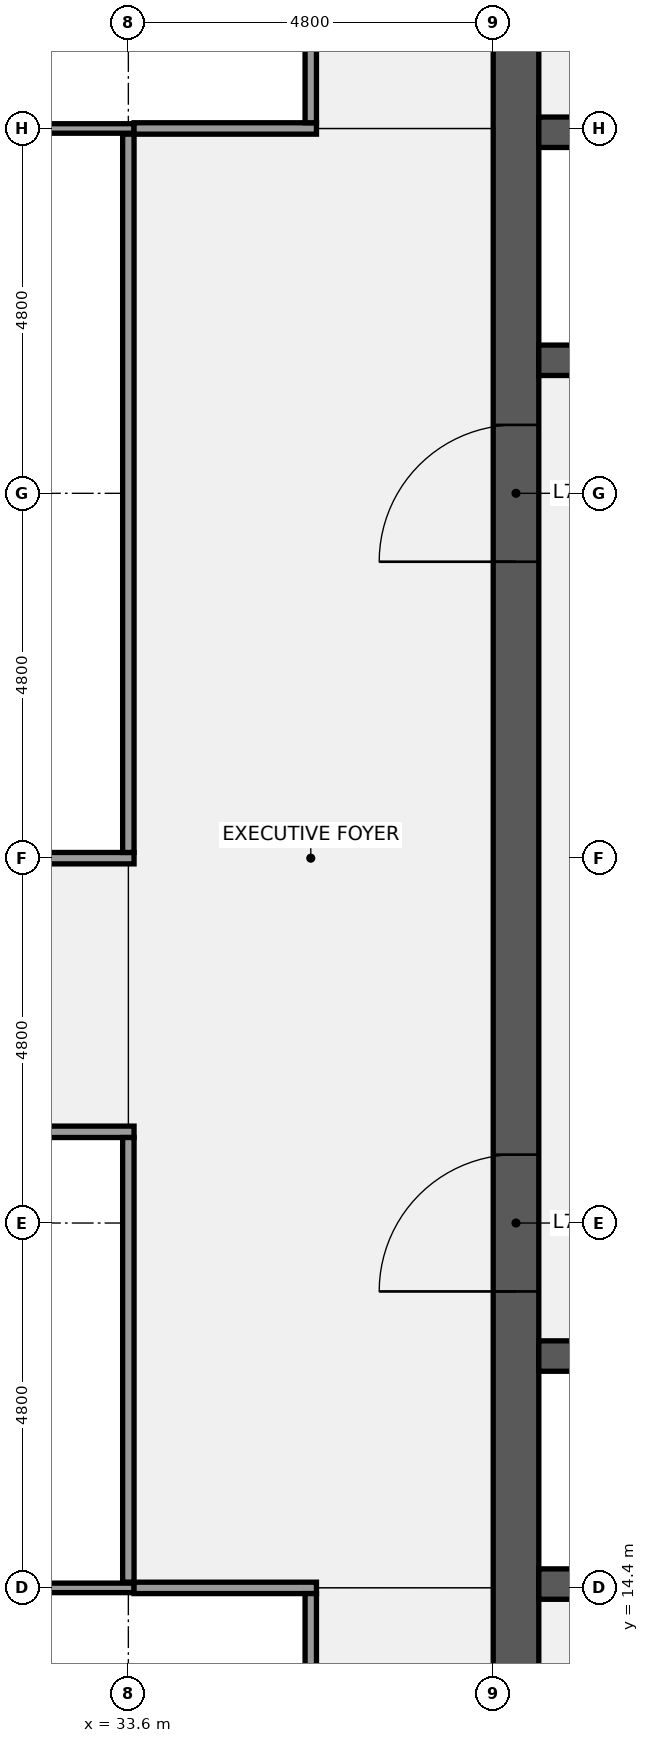
"""IFC4 building model, lengths in metres.
Left out: names, types, materials, properties, quantities, classifications, styles, units other than length and angle.
Written with IfcOpenShell. Run it as: python <this file> out.ifc"""

import sys

from ifc_helpers import new_model, si_unit, direction, frame, frame_2d, origin, place, context, subcontext, project, spatial, rectangle, extrude, element, fill, save


model = new_model("IFC4")
c1 = context("Model", 3, precision=1e-05, world=origin(), true_north=direction((0.0, 1.0)))
c2 = subcontext(c1, "Body", "Model", "MODEL_VIEW")
j1 = project(units=[si_unit("LENGTHUNIT", "METRE"), si_unit("PLANEANGLEUNIT", "RADIAN")], contexts=[c1])
p1 = place(None, origin())
s1 = spatial("IfcSite", under=j1, at=p1, CompositionType="ELEMENT")
p2 = place(p1, origin())
s2 = spatial("IfcBuilding", under=s1, at=p2, CompositionType="ELEMENT")
p3 = place(p2, frame((0.0, 0.0, 346.3)))
s3 = spatial("IfcBuildingStorey", under=s2, at=p3, CompositionType="ELEMENT", Elevation=346.3)
p4 = place(p3, frame((38.7, 9.6, 0.0), z_axis=(0.0, 0.0, 1.0), x_axis=(0.0, 1.0, 0.0)))
e1 = element("IfcWall", 1, at=p4, inside=s3, PredefinedType="SHEAR", context=c2, shape_type="SweptSolid", body=[
    extrude(rectangle(XDim=28.8, YDim=0.6, at=frame_2d((14.4, 0.0))), origin(), (0.0, 0.0, 1.0), 3.84),
])
p5 = place(p4, frame((8.7, 0.0, 0.0)))
e2 = element("IfcOpeningElement", 2, at=p5, cuts=e1, PredefinedType="OPENING", context=c2, shape_type="SweptSolid", body=[
    extrude(rectangle(XDim=1.8, YDim=2.1, at=frame_2d((0.9, 1.05))), frame((0.0, 0.31, 0.0), z_axis=(0.0, -1.0, 0.0), x_axis=(1.0, 0.0, 0.0)), (0.0, 0.0, 1.0), 0.62),
])
p6 = place(p4, frame((18.3, 0.0, 0.0)))
e3 = element("IfcOpeningElement", 3, at=p6, cuts=e1, PredefinedType="OPENING", context=c2, shape_type="SweptSolid", body=[
    extrude(rectangle(XDim=1.8, YDim=2.1, at=frame_2d((0.9, 1.05))), frame((0.0, 0.31, 0.0), z_axis=(0.0, -1.0, 0.0), x_axis=(1.0, 0.0, 0.0)), (0.0, 0.0, 1.0), 0.62),
])
p7 = place(p3, frame((39.0, 14.45, 0.0), z_axis=(0.0, 0.0, 1.0), x_axis=(1.0, 0.0, 0.0)))
e4 = element("IfcWall", 4, at=p7, inside=s3, PredefinedType="SHEAR", context=c2, shape_type="SweptSolid", body=[
    extrude(rectangle(XDim=18.0, YDim=0.4, at=frame_2d((9.0, 0.0))), origin(), (0.0, 0.0, 1.0), 3.84),
])
p8 = place(p3, frame((39.0, 17.45, 0.0), z_axis=(0.0, 0.0, 1.0), x_axis=(1.0, 0.0, 0.0)))
e5 = element("IfcWall", 5, at=p8, inside=s3, PredefinedType="SHEAR", context=c2, shape_type="SweptSolid", body=[
    extrude(rectangle(XDim=18.0, YDim=0.4, at=frame_2d((9.0, 0.0))), origin(), (0.0, 0.0, 1.0), 3.84),
])
p9 = place(p8, frame((13.637, 0.0, 0.0)))
e6 = element("IfcOpeningElement", 6, at=p9, cuts=e5, PredefinedType="OPENING", context=c2, shape_type="SweptSolid", body=[
    extrude(rectangle(XDim=1.0, YDim=2.1, at=frame_2d((0.5, 1.05))), frame((0.0, 0.21, 0.0), z_axis=(0.0, -1.0, 0.0), x_axis=(1.0, 0.0, 0.0)), (0.0, 0.0, 1.0), 0.42),
])
p10 = place(p8, frame((7.9, 0.0, 0.0)))
e7 = element("IfcOpeningElement", 7, at=p10, cuts=e5, PredefinedType="OPENING", context=c2, shape_type="SweptSolid", body=[
    extrude(rectangle(XDim=1.0, YDim=2.1, at=frame_2d((0.5, 1.05))), frame((0.0, 0.21, 0.0), z_axis=(0.0, -1.0, 0.0), x_axis=(1.0, 0.0, 0.0)), (0.0, 0.0, 1.0), 0.42),
])
p11 = place(p8, frame((4.6, 0.0, 0.0)))
e8 = element("IfcOpeningElement", 8, at=p11, cuts=e5, PredefinedType="OPENING", context=c2, shape_type="SweptSolid", body=[
    extrude(rectangle(XDim=1.0, YDim=2.1, at=frame_2d((0.5, 1.05))), frame((0.0, 0.21, 0.0), z_axis=(0.0, -1.0, 0.0), x_axis=(1.0, 0.0, 0.0)), (0.0, 0.0, 1.0), 0.42),
])
p12 = place(p8, frame((1.262, 0.0, 0.0)))
e9 = element("IfcOpeningElement", 9, at=p12, cuts=e5, PredefinedType="OPENING", context=c2, shape_type="SweptSolid", body=[
    extrude(rectangle(XDim=1.0, YDim=2.1, at=frame_2d((0.5, 1.05))), frame((0.0, 0.21, 0.0), z_axis=(0.0, -1.0, 0.0), x_axis=(1.0, 0.0, 0.0)), (0.0, 0.0, 1.0), 0.42),
])
p13 = place(p3, frame((39.0, 30.55, 0.0), z_axis=(0.0, 0.0, 1.0), x_axis=(1.0, 0.0, 0.0)))
e10 = element("IfcWall", 10, at=p13, inside=s3, PredefinedType="SHEAR", context=c2, shape_type="SweptSolid", body=[
    extrude(rectangle(XDim=18.0, YDim=0.4, at=frame_2d((9.0, 0.0))), origin(), (0.0, 0.0, 1.0), 3.84),
])
p14 = place(p13, frame((15.2, 0.0, 0.0)))
e11 = element("IfcOpeningElement", 11, at=p14, cuts=e10, PredefinedType="OPENING", context=c2, shape_type="SweptSolid", body=[
    extrude(rectangle(XDim=1.2, YDim=2.1, at=frame_2d((0.6, 1.05))), frame((0.0, 0.21, 0.0), z_axis=(0.0, -1.0, 0.0), x_axis=(1.0, 0.0, 0.0)), (0.0, 0.0, 1.0), 0.42),
])
p15 = place(p13, frame((12.6, 0.0, 0.0)))
e12 = element("IfcOpeningElement", 12, at=p15, cuts=e10, PredefinedType="OPENING", context=c2, shape_type="SweptSolid", body=[
    extrude(rectangle(XDim=1.2, YDim=2.1, at=frame_2d((0.6, 1.05))), frame((0.0, 0.21, 0.0), z_axis=(0.0, -1.0, 0.0), x_axis=(1.0, 0.0, 0.0)), (0.0, 0.0, 1.0), 0.42),
])
p16 = place(p13, frame((10.0, 0.0, 0.0)))
e13 = element("IfcOpeningElement", 13, at=p16, cuts=e10, PredefinedType="OPENING", context=c2, shape_type="SweptSolid", body=[
    extrude(rectangle(XDim=1.2, YDim=2.1, at=frame_2d((0.6, 1.05))), frame((0.0, 0.21, 0.0), z_axis=(0.0, -1.0, 0.0), x_axis=(1.0, 0.0, 0.0)), (0.0, 0.0, 1.0), 0.42),
])
p17 = place(p13, frame((6.8, 0.0, 0.0)))
e14 = element("IfcOpeningElement", 14, at=p17, cuts=e10, PredefinedType="OPENING", context=c2, shape_type="SweptSolid", body=[
    extrude(rectangle(XDim=1.2, YDim=2.1, at=frame_2d((0.6, 1.05))), frame((0.0, 0.21, 0.0), z_axis=(0.0, -1.0, 0.0), x_axis=(1.0, 0.0, 0.0)), (0.0, 0.0, 1.0), 0.42),
])
p18 = place(p13, frame((4.2, 0.0, 0.0)))
e15 = element("IfcOpeningElement", 15, at=p18, cuts=e10, PredefinedType="OPENING", context=c2, shape_type="SweptSolid", body=[
    extrude(rectangle(XDim=1.2, YDim=2.1, at=frame_2d((0.6, 1.05))), frame((0.0, 0.21, 0.0), z_axis=(0.0, -1.0, 0.0), x_axis=(1.0, 0.0, 0.0)), (0.0, 0.0, 1.0), 0.42),
])
p19 = place(p13, frame((1.6, 0.0, 0.0)))
e16 = element("IfcOpeningElement", 16, at=p19, cuts=e10, PredefinedType="OPENING", context=c2, shape_type="SweptSolid", body=[
    extrude(rectangle(XDim=1.2, YDim=2.1, at=frame_2d((0.6, 1.05))), frame((0.0, 0.21, 0.0), z_axis=(0.0, -1.0, 0.0), x_axis=(1.0, 0.0, 0.0)), (0.0, 0.0, 1.0), 0.42),
])
p20 = place(p3, frame((39.0, 33.55, 0.0), z_axis=(0.0, 0.0, 1.0), x_axis=(1.0, 0.0, 0.0)))
e17 = element("IfcWall", 17, at=p20, inside=s3, PredefinedType="SHEAR", context=c2, shape_type="SweptSolid", body=[
    extrude(rectangle(XDim=18.0, YDim=0.4, at=frame_2d((9.0, 0.0))), origin(), (0.0, 0.0, 1.0), 3.84),
])
p21 = place(p3, frame((24.075, 14.4, 0.0), z_axis=(0.0, 0.0, 1.0), x_axis=(1.0, 0.0, 0.0)))
e18 = element("IfcWall", 18, at=p21, inside=s3, PredefinedType="PARTITIONING", context=c2, shape_type="SweptSolid", body=[
    extrude(rectangle(XDim=9.6, YDim=0.125, at=frame_2d((4.8, 0.0))), origin(), (0.0, 0.0, 1.0), 2.849),
])
p22 = place(p3, frame((33.675, 14.4, 0.0), z_axis=(0.0, 0.0, 1.0), x_axis=(1.0, 0.0, 0.0)))
e19 = element("IfcWall", 19, at=p22, inside=s3, PredefinedType="PARTITIONING", context=c2, shape_type="SweptSolid", body=[
    extrude(rectangle(XDim=2.4, YDim=0.15, at=frame_2d((1.2, 0.0))), origin(), (0.0, 0.0, 1.0), 2.849),
])
p23 = place(p3, frame((23.925, 20.4, 0.0), z_axis=(0.0, 0.0, 1.0), x_axis=(1.0, 0.0, 0.0)))
e20 = element("IfcWall", 20, at=p23, inside=s3, PredefinedType="PARTITIONING", context=c2, shape_type="SweptSolid", body=[
    extrude(rectangle(XDim=9.75, YDim=0.15, at=frame_2d((4.875, 0.0))), origin(), (0.0, 0.0, 1.0), 2.849),
])
p24 = place(p23, frame((4.375, 0.0, 0.0)))
e21 = element("IfcOpeningElement", 21, at=p24, cuts=e20, PredefinedType="OPENING", context=c2, shape_type="SweptSolid", body=[
    extrude(rectangle(XDim=1.0, YDim=2.1, at=frame_2d((0.5, 1.05))), frame((0.0, 0.085, 0.0), z_axis=(0.0, -1.0, 0.0), x_axis=(1.0, 0.0, 0.0)), (0.0, 0.0, 1.0), 0.17),
])
p25 = place(p3, frame((23.925, 24.0, 0.0), z_axis=(0.0, 0.0, 1.0), x_axis=(1.0, 0.0, 0.0)))
e22 = element("IfcWall", 22, at=p25, inside=s3, PredefinedType="PARTITIONING", context=c2, shape_type="SweptSolid", body=[
    extrude(rectangle(XDim=9.75, YDim=0.15, at=frame_2d((4.875, 0.0))), origin(), (0.0, 0.0, 1.0), 2.849),
])
p26 = place(p3, frame((24.075, 33.6, 0.0), z_axis=(0.0, 0.0, 1.0), x_axis=(1.0, 0.0, 0.0)))
e23 = element("IfcWall", 23, at=p26, inside=s3, PredefinedType="PARTITIONING", context=c2, shape_type="SweptSolid", body=[
    extrude(rectangle(XDim=9.6, YDim=0.125, at=frame_2d((4.8, 0.0))), origin(), (0.0, 0.0, 1.0), 2.849),
])
p27 = place(p3, frame((33.675, 33.6, 0.0), z_axis=(0.0, 0.0, 1.0), x_axis=(1.0, 0.0, 0.0)))
e24 = element("IfcWall", 24, at=p27, inside=s3, PredefinedType="PARTITIONING", context=c2, shape_type="SweptSolid", body=[
    extrude(rectangle(XDim=2.4, YDim=0.15, at=frame_2d((1.2, 0.0))), origin(), (0.0, 0.0, 1.0), 2.849),
])
p28 = place(p3, frame((33.6, 14.475, 0.0), z_axis=(0.0, 0.0, 1.0), x_axis=(0.0, 1.0, 0.0)))
e25 = element("IfcWall", 25, at=p28, inside=s3, PredefinedType="PARTITIONING", context=c2, shape_type="SweptSolid", body=[
    extrude(rectangle(XDim=5.85, YDim=0.15, at=frame_2d((2.925, 0.0))), origin(), (0.0, 0.0, 1.0), 2.849),
])
p29 = place(p3, frame((33.6, 24.075, 0.0), z_axis=(0.0, 0.0, 1.0), x_axis=(0.0, 1.0, 0.0)))
e26 = element("IfcWall", 26, at=p29, inside=s3, PredefinedType="PARTITIONING", context=c2, shape_type="SweptSolid", body=[
    extrude(rectangle(XDim=9.45, YDim=0.15, at=frame_2d((4.725, 0.0))), origin(), (0.0, 0.0, 1.0), 2.849),
])
for number, where, z_axis, x_axis in (
    (27, (36.0, 9.675, 0.0), (0.0, 0.0, 1.0), (0.0, 1.0, 0.0)),
    (28, (36.0, 33.675, 0.0), (0.0, 0.0, 1.0), (0.0, 1.0, 0.0)),
):
    element("IfcWall", number, at=place(p3, frame(where, z_axis=z_axis, x_axis=x_axis)), inside=s3, PredefinedType="PARTITIONING", context=c2, shape_type="SweptSolid", body=[
        extrude(rectangle(XDim=4.65, YDim=0.15, at=frame_2d((2.325, 0.0))), origin(), (0.0, 0.0, 1.0), 2.849),
    ])
p30 = place(p5, origin())
e29 = element("IfcDoor", 29, at=p30, inside=s3, OperationType="DOUBLE_DOOR_SINGLE_SWING", PredefinedType="DOOR", context=c2, shape_type="SweptSolid", body=[
    extrude(rectangle(XDim=1.8, YDim=2.1, at=frame_2d((0.9, 1.05))), frame((0.0, 0.025, 0.0), z_axis=(0.0, -1.0, 0.0), x_axis=(1.0, 0.0, 0.0)), (0.0, 0.0, 1.0), 0.05),
])
fill(e2, e29)
p31 = place(p6, origin())
e30 = element("IfcDoor", 30, at=p31, inside=s3, OperationType="DOUBLE_DOOR_SINGLE_SWING", PredefinedType="DOOR", context=c2, shape_type="SweptSolid", body=[
    extrude(rectangle(XDim=1.8, YDim=2.1, at=frame_2d((0.9, 1.05))), frame((0.0, 0.025, 0.0), z_axis=(0.0, -1.0, 0.0), x_axis=(1.0, 0.0, 0.0)), (0.0, 0.0, 1.0), 0.05),
])
fill(e3, e30)
save(model, sys.argv[1])
